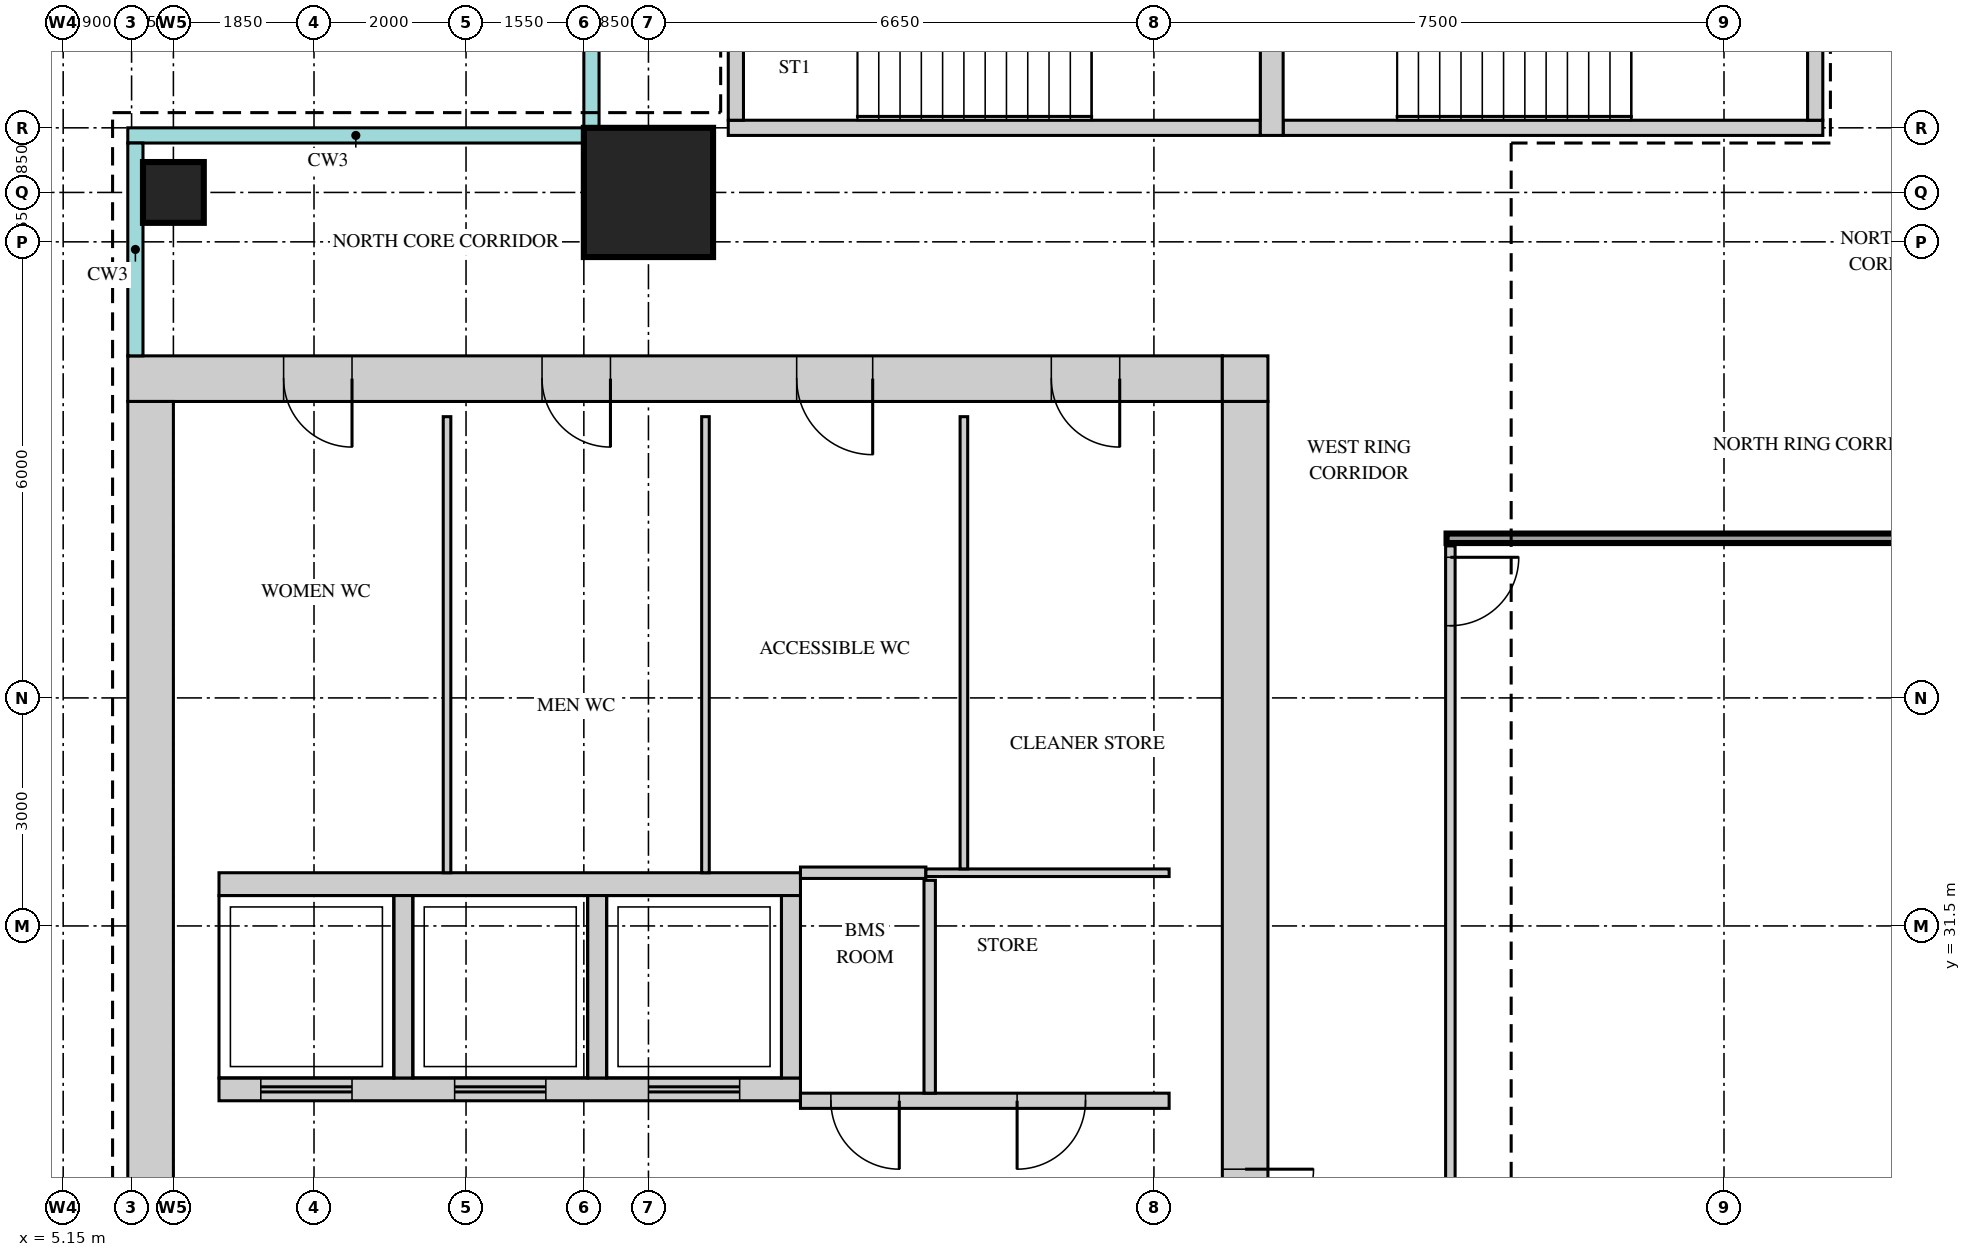
"""IFC4 building model, lengths in metres.
Left out: names, types, materials, properties, quantities, classifications, styles, units other than length and angle.
Written with IfcOpenShell. Run it as: python <this file> out.ifc"""

import sys

from ifc_helpers import new_model, si_unit, direction, frame, frame_2d, origin, origin_2d, place, context, subcontext, project, spatial, rectangle, extrude, source, transform, mapped, element, fill, save


model = new_model("IFC4")
c1 = context("Model", 3, precision=1e-05, world=origin(), true_north=direction((0.0, 1.0)))
c2 = subcontext(c1, "Body", "Model", "MODEL_VIEW")
j1 = project(units=[si_unit("LENGTHUNIT", "METRE"), si_unit("PLANEANGLEUNIT", "RADIAN")], contexts=[c1])
p1 = place(None, origin())
s1 = spatial("IfcSite", under=j1, at=p1, CompositionType="ELEMENT")
p2 = place(p1, origin())
s2 = spatial("IfcBuilding", under=s1, at=p2, CompositionType="ELEMENT")
p3 = place(p2, frame((0.0, 0.0, 322.2)))
s3 = spatial("IfcBuildingStorey", under=s2, at=p3, CompositionType="ELEMENT", Elevation=322.2)
m1 = source(origin(), c2, "Body", "SweptSolid", [
    extrude(rectangle(XDim=14.4, YDim=0.6, at=frame_2d((7.2, 0.0))), origin(), (0.0, 0.0, 1.0), 3.75),
])
p4 = place(p3, frame((6.0, 38.7, 0.0), z_axis=(0.0, 0.0, 1.0), x_axis=(1.0, 0.0, 0.0)))
e1 = element("IfcWall", 1, at=p4, inside=s3, PredefinedType="SHEAR", context=c2, shape_type="MappedRepresentation", body=[
    mapped(m1, transform((0.0, 0.0, 0.0))),
])
m2 = source(origin(), c2, "Body", "SweptSolid", [
    extrude(rectangle(XDim=0.9, YDim=2.1, at=frame_2d((0.45, 1.05))), frame((0.0, 0.31, 0.0), z_axis=(0.0, -1.0, 0.0), x_axis=(1.0, 0.0, 0.0)), (0.0, 0.0, 1.0), 0.62),
])
p5 = place(p4, frame((2.05, 0.0, 0.0)))
e2 = element("IfcOpeningElement", 2, at=p5, cuts=e1, PredefinedType="OPENING", context=c2, shape_type="MappedRepresentation", body=[
    mapped(m2, transform((0.0, 0.0, 0.0))),
])
p6 = place(p4, frame((5.45, 0.0, 0.0)))
e3 = element("IfcOpeningElement", 3, at=p6, cuts=e1, PredefinedType="OPENING", context=c2, shape_type="MappedRepresentation", body=[
    mapped(m2, transform((0.0, 0.0, 0.0))),
])
m3 = source(origin(), c2, "Body", "SweptSolid", [
    extrude(rectangle(XDim=1.0, YDim=2.1, at=frame_2d((0.5, 1.05))), frame((0.0, 0.31, 0.0), z_axis=(0.0, -1.0, 0.0), x_axis=(1.0, 0.0, 0.0)), (0.0, 0.0, 1.0), 0.62),
])
p7 = place(p4, frame((8.8, 0.0, 0.0)))
e4 = element("IfcOpeningElement", 4, at=p7, cuts=e1, PredefinedType="OPENING", context=c2, shape_type="MappedRepresentation", body=[
    mapped(m3, transform((0.0, 0.0, 0.0))),
])
p8 = place(p4, frame((12.15, 0.0, 0.0)))
e5 = element("IfcOpeningElement", 5, at=p8, cuts=e1, PredefinedType="OPENING", context=c2, shape_type="MappedRepresentation", body=[
    mapped(m2, transform((0.0, 0.0, 0.0))),
])
m4 = source(origin(), c2, "Body", "SweptSolid", [
    extrude(rectangle(XDim=0.6, YDim=0.6, at=frame_2d((0.3, 0.0))), origin(), (0.0, 0.0, 1.0), 3.75),
])
p9 = place(p3, frame((20.4, 38.7, 0.0), z_axis=(0.0, 0.0, 1.0), x_axis=(1.0, 0.0, 0.0)))
e6 = element("IfcWall", 6, at=p9, inside=s3, PredefinedType="SHEAR", context=c2, shape_type="MappedRepresentation", body=[
    mapped(m4, transform((0.0, 0.0, 0.0))),
])
m5 = source(origin(), c2, "Body", "SweptSolid", [
    extrude(rectangle(XDim=22.8, YDim=0.6, at=frame_2d((11.4, 0.0))), origin(), (0.0, 0.0, 1.0), 3.75),
])
p10 = place(p3, frame((20.7, 15.6, 0.0), z_axis=(0.0, 0.0, 1.0), x_axis=(0.0, 1.0, 0.0)))
e7 = element("IfcWall", 7, at=p10, inside=s3, PredefinedType="SHEAR", context=c2, shape_type="MappedRepresentation", body=[
    mapped(m5, transform((0.0, 0.0, 0.0))),
])
m6 = source(origin(), c2, "Body", "SweptSolid", [
    extrude(rectangle(XDim=1.8, YDim=2.1, at=frame_2d((0.9, 1.05))), frame((0.0, 0.31, 0.0), z_axis=(0.0, -1.0, 0.0), x_axis=(1.0, 0.0, 0.0)), (0.0, 0.0, 1.0), 0.62),
])
p11 = place(p10, frame((10.9, 0.0, 0.0)))
e8 = element("IfcOpeningElement", 8, at=p11, cuts=e7, PredefinedType="OPENING", context=c2, shape_type="MappedRepresentation", body=[
    mapped(m6, transform((0.0, 0.0, 0.0))),
])
p12 = place(p10, frame((0.55, 0.0, 0.0)))
e9 = element("IfcOpeningElement", 9, at=p12, cuts=e7, PredefinedType="OPENING", context=c2, shape_type="MappedRepresentation", body=[
    mapped(m2, transform((0.0, 0.0, 0.0))),
])
p13 = place(p10, frame((4.1, 0.0, 0.0)))
e10 = element("IfcOpeningElement", 10, at=p13, cuts=e7, PredefinedType="OPENING", context=c2, shape_type="MappedRepresentation", body=[
    mapped(m2, transform((0.0, 0.0, 0.0))),
])
p14 = place(p3, frame((6.3, 15.6, 0.0), z_axis=(0.0, 0.0, 1.0), x_axis=(0.0, 1.0, 0.0)))
e11 = element("IfcWall", 11, at=p14, inside=s3, PredefinedType="SHEAR", context=c2, shape_type="MappedRepresentation", body=[
    mapped(m5, transform((0.0, 0.0, 0.0))),
])
m7 = source(origin(), c2, "Body", "SweptSolid", [
    extrude(rectangle(XDim=7.0, YDim=0.2, at=frame_2d((3.5, 0.0))), origin(), (0.0, 0.0, 1.0), 3.75),
])
p15 = place(p3, frame((13.9, 42.0, 0.0), z_axis=(0.0, 0.0, 1.0), x_axis=(1.0, 0.0, 0.0)))
e12 = element("IfcWall", 12, at=p15, inside=s3, PredefinedType="SHEAR", context=c2, shape_type="MappedRepresentation", body=[
    mapped(m7, transform((0.0, 0.0, 0.0))),
])
m8 = source(origin(), c2, "Body", "SweptSolid", [
    extrude(rectangle(XDim=7.1, YDim=0.2, at=frame_2d((3.55, 0.0))), origin(), (0.0, 0.0, 1.0), 3.75),
])
p16 = place(p3, frame((21.2, 42.0, 0.0), z_axis=(0.0, 0.0, 1.0), x_axis=(1.0, 0.0, 0.0)))
e13 = element("IfcWall", 13, at=p16, inside=s3, PredefinedType="SHEAR", context=c2, shape_type="MappedRepresentation", body=[
    mapped(m8, transform((0.0, 0.0, 0.0))),
])
m9 = source(origin(), c2, "Body", "SweptSolid", [
    extrude(rectangle(XDim=3.75, YDim=0.3, at=frame_2d((1.875, 0.0))), origin(), (0.0, 0.0, 1.0), 3.75),
])
p17 = place(p3, frame((21.05, 41.9, 0.0), z_axis=(0.0, 0.0, 1.0), x_axis=(0.0, 1.0, 0.0)))
e14 = element("IfcWall", 14, at=p17, inside=s3, PredefinedType="SHEAR", context=c2, shape_type="MappedRepresentation", body=[
    mapped(m9, transform((0.0, 0.0, 0.0))),
])
m10 = source(origin(), c2, "Body", "SweptSolid", [
    extrude(rectangle(XDim=3.35, YDim=0.2, at=frame_2d((1.675, 0.0))), origin(), (0.0, 0.0, 1.0), 3.75),
])
for number, where, z_axis, x_axis in (
    (15, (14.0, 42.1, 0.0), (0.0, 0.0, 1.0), (0.0, 1.0, 0.0)),
    (16, (28.2, 42.1, 0.0), (0.0, 0.0, 1.0), (0.0, 1.0, 0.0)),
):
    element("IfcWall", number, at=place(p3, frame(where, z_axis=z_axis, x_axis=x_axis)), inside=s3, PredefinedType="SHEAR", context=c2, shape_type="MappedRepresentation", body=[
        mapped(m10, transform((0.0, 0.0, 0.0))),
    ])
m11 = source(origin(), c2, "Body", "SweptSolid", [
    extrude(rectangle(XDim=7.65, YDim=0.3, at=frame_2d((3.825, 0.0))), origin(), (0.0, 0.0, 1.0), 3.75),
])
p18 = place(p3, frame((7.2, 32.05, 0.0), z_axis=(0.0, 0.0, 1.0), x_axis=(1.0, 0.0, 0.0)))
e17 = element("IfcWall", 17, at=p18, inside=s3, PredefinedType="STANDARD", context=c2, shape_type="MappedRepresentation", body=[
    mapped(m11, transform((0.0, 0.0, 0.0))),
])
p19 = place(p3, frame((7.2, 29.35, 0.0), z_axis=(0.0, 0.0, 1.0), x_axis=(1.0, 0.0, 0.0)))
e18 = element("IfcWall", 18, at=p19, inside=s3, PredefinedType="STANDARD", context=c2, shape_type="MappedRepresentation", body=[
    mapped(m11, transform((0.0, 0.0, 0.0))),
])
m12 = source(origin(), c2, "Body", "SweptSolid", [
    extrude(rectangle(XDim=1.2, YDim=2.1, at=frame_2d((0.6, 1.05))), frame((0.0, 0.16, 0.0), z_axis=(0.0, -1.0, 0.0), x_axis=(1.0, 0.0, 0.0)), (0.0, 0.0, 1.0), 0.32),
])
p20 = place(p19, frame((0.55, 0.0, 0.0)))
e19 = element("IfcOpeningElement", 19, at=p20, cuts=e18, PredefinedType="OPENING", context=c2, shape_type="MappedRepresentation", body=[
    mapped(m12, transform((0.0, 0.0, 0.0))),
])
p21 = place(p19, frame((3.1, 0.0, 0.0)))
e20 = element("IfcOpeningElement", 20, at=p21, cuts=e18, PredefinedType="OPENING", context=c2, shape_type="MappedRepresentation", body=[
    mapped(m12, transform((0.0, 0.0, 0.0))),
])
p22 = place(p19, frame((5.65, 0.0, 0.0)))
e21 = element("IfcOpeningElement", 21, at=p22, cuts=e18, PredefinedType="OPENING", context=c2, shape_type="MappedRepresentation", body=[
    mapped(m12, transform((0.0, 0.0, 0.0))),
])
m13 = source(origin(), c2, "Body", "SweptSolid", [
    extrude(rectangle(XDim=2.4, YDim=0.25, at=frame_2d((1.2, 0.0))), origin(), (0.0, 0.0, 1.0), 3.75),
])
for number, where, z_axis, x_axis in (
    (22, (9.625, 29.5, 0.0), (0.0, 0.0, 1.0), (0.0, 1.0, 0.0)),
    (23, (12.175, 29.5, 0.0), (0.0, 0.0, 1.0), (0.0, 1.0, 0.0)),
    (24, (14.725, 29.5, 0.0), (0.0, 0.0, 1.0), (0.0, 1.0, 0.0)),
):
    element("IfcWall", number, at=place(p3, frame(where, z_axis=z_axis, x_axis=x_axis)), inside=s3, PredefinedType="STANDARD", context=c2, shape_type="MappedRepresentation", body=[
        mapped(m13, transform((0.0, 0.0, 0.0))),
    ])
m14 = source(origin(), c2, "Body", "SweptSolid", [
    extrude(rectangle(XDim=1.7, YDim=1.7, at=origin_2d()), origin(), (0.0, 0.0, 1.0), 3.75),
])
p23 = place(p3, frame((12.85, 41.15, 0.0), z_axis=(0.0, 0.0, 1.0), x_axis=(1.0, 0.0, 0.0)))
e25 = element("IfcColumn", 25, at=p23, inside=s3, PredefinedType="COLUMN", context=c2, shape_type="MappedRepresentation", body=[
    mapped(m14, transform((0.0, 0.0, 0.0))),
])
m15 = source(origin(), c2, "Body", "SweptSolid", [
    extrude(rectangle(XDim=0.8, YDim=0.8, at=origin_2d()), origin(), (0.0, 0.0, 1.0), 3.75),
])
p24 = place(p3, frame((6.6, 41.15, 0.0), z_axis=(0.0, 0.0, 1.0), x_axis=(1.0, 0.0, 0.0)))
e26 = element("IfcColumn", 26, at=p24, inside=s3, PredefinedType="COLUMN", context=c2, shape_type="MappedRepresentation", body=[
    mapped(m15, transform((0.0, 0.0, 0.0))),
])
m16 = source(origin(), c2, "Body", "SweptSolid", [
    extrude(rectangle(XDim=19.0, YDim=0.125, at=frame_2d((9.5, 0.0))), origin(), (0.0, 0.0, 1.0), 3.8),
])
p25 = place(p3, frame((23.4, 17.5, 0.0), z_axis=(0.0, 0.0, 1.0), x_axis=(0.0, 1.0, 0.0)))
e27 = element("IfcWall", 27, at=p25, inside=s3, PredefinedType="PARTITIONING", context=c2, shape_type="MappedRepresentation", body=[
    mapped(m16, transform((0.0, 0.0, 0.0))),
])
m17 = source(origin(), c2, "Body", "SweptSolid", [
    extrude(rectangle(XDim=1.2, YDim=2.1, at=frame_2d((0.6, 1.05))), frame((0.0, 0.073, 0.0), z_axis=(0.0, -1.0, 0.0), x_axis=(1.0, 0.0, 0.0)), (0.0, 0.0, 1.0), 0.145),
])
p26 = place(p25, frame((8.9, 0.0, 0.0)))
e28 = element("IfcOpeningElement", 28, at=p26, cuts=e27, PredefinedType="OPENING", context=c2, shape_type="MappedRepresentation", body=[
    mapped(m17, transform((0.0, 0.0, 0.0))),
])
m18 = source(origin(), c2, "Body", "SweptSolid", [
    extrude(rectangle(XDim=0.9, YDim=2.1, at=frame_2d((0.45, 1.05))), frame((0.0, 0.073, 0.0), z_axis=(0.0, -1.0, 0.0), x_axis=(1.0, 0.0, 0.0)), (0.0, 0.0, 1.0), 0.145),
])
p27 = place(p25, frame((17.95, 0.0, 0.0)))
e29 = element("IfcOpeningElement", 29, at=p27, cuts=e27, PredefinedType="OPENING", context=c2, shape_type="MappedRepresentation", body=[
    mapped(m18, transform((0.0, 0.0, 0.0))),
])
m19 = source(origin(), c2, "Body", "SweptSolid", [
    extrude(rectangle(XDim=4.85, YDim=0.2, at=frame_2d((2.425, 0.0))), origin(), (0.0, 0.0, 1.0), 3.8),
])
p28 = place(p3, frame((14.85, 29.2, 0.0), z_axis=(0.0, 0.0, 1.0), x_axis=(1.0, 0.0, 0.0)))
e30 = element("IfcWall", 30, at=p28, inside=s3, PredefinedType="PARTITIONING", context=c2, shape_type="MappedRepresentation", body=[
    mapped(m19, transform((0.0, 0.0, 0.0))),
])
m20 = source(origin(), c2, "Body", "SweptSolid", [
    extrude(rectangle(XDim=0.9, YDim=2.1, at=frame_2d((0.45, 1.05))), frame((0.0, 0.11, 0.0), z_axis=(0.0, -1.0, 0.0), x_axis=(1.0, 0.0, 0.0)), (0.0, 0.0, 1.0), 0.22),
])
p29 = place(p28, frame((0.4, 0.0, 0.0)))
e31 = element("IfcOpeningElement", 31, at=p29, cuts=e30, PredefinedType="OPENING", context=c2, shape_type="MappedRepresentation", body=[
    mapped(m20, transform((0.0, 0.0, 0.0))),
])
p30 = place(p28, frame((2.85, 0.0, 0.0)))
e32 = element("IfcOpeningElement", 32, at=p30, cuts=e30, PredefinedType="OPENING", context=c2, shape_type="MappedRepresentation", body=[
    mapped(m20, transform((0.0, 0.0, 0.0))),
])
m21 = source(origin(), c2, "Body", "SweptSolid", [
    extrude(rectangle(XDim=2.8, YDim=0.15, at=frame_2d((1.4, 0.0))), origin(), (0.0, 0.0, 1.0), 3.8),
])
p31 = place(p3, frame((16.55, 29.3, 0.0), z_axis=(0.0, 0.0, 1.0), x_axis=(0.0, 1.0, 0.0)))
e33 = element("IfcWall", 33, at=p31, inside=s3, PredefinedType="PARTITIONING", context=c2, shape_type="MappedRepresentation", body=[
    mapped(m21, transform((0.0, 0.0, 0.0))),
])
m22 = source(origin(), c2, "Body", "SweptSolid", [
    extrude(rectangle(XDim=6.0, YDim=0.1, at=frame_2d((3.0, 0.0))), origin(), (0.0, 0.0, 1.0), 3.8),
])
for number, where, z_axis, x_axis in (
    (34, (10.2, 32.2, 0.0), (0.0, 0.0, 1.0), (0.0, 1.0, 0.0)),
    (35, (13.6, 32.2, 0.0), (0.0, 0.0, 1.0), (0.0, 1.0, 0.0)),
):
    element("IfcWall", number, at=place(p3, frame(where, z_axis=z_axis, x_axis=x_axis)), inside=s3, PredefinedType="PARTITIONING", context=c2, shape_type="MappedRepresentation", body=[
        mapped(m22, transform((0.0, 0.0, 0.0))),
    ])
m23 = source(origin(), c2, "Body", "SweptSolid", [
    extrude(rectangle(XDim=1.65, YDim=0.15, at=frame_2d((0.825, 0.0))), origin(), (0.0, 0.0, 1.0), 3.8),
])
p32 = place(p3, frame((14.85, 32.2, 0.0), z_axis=(0.0, 0.0, 1.0), x_axis=(1.0, 0.0, 0.0)))
e36 = element("IfcWall", 36, at=p32, inside=s3, PredefinedType="PARTITIONING", context=c2, shape_type="MappedRepresentation", body=[
    mapped(m23, transform((0.0, 0.0, 0.0))),
])
m24 = source(origin(), c2, "Body", "SweptSolid", [
    extrude(rectangle(XDim=3.2, YDim=0.1, at=frame_2d((1.6, 0.0))), origin(), (0.0, 0.0, 1.0), 3.8),
])
p33 = place(p3, frame((16.5, 32.2, 0.0), z_axis=(0.0, 0.0, 1.0), x_axis=(1.0, 0.0, 0.0)))
e37 = element("IfcWall", 37, at=p33, inside=s3, PredefinedType="PARTITIONING", context=c2, shape_type="MappedRepresentation", body=[
    mapped(m24, transform((0.0, 0.0, 0.0))),
])
m25 = source(origin(), c2, "Body", "SweptSolid", [
    extrude(rectangle(XDim=5.95, YDim=0.1, at=frame_2d((2.975, 0.0))), origin(), (0.0, 0.0, 1.0), 3.8),
])
p34 = place(p3, frame((17.0, 32.25, 0.0), z_axis=(0.0, 0.0, 1.0), x_axis=(0.0, 1.0, 0.0)))
e38 = element("IfcWall", 38, at=p34, inside=s3, PredefinedType="PARTITIONING", context=c2, shape_type="MappedRepresentation", body=[
    mapped(m25, transform((0.0, 0.0, 0.0))),
])
m26 = source(origin(), c2, "Body", "SweptSolid", [
    extrude(rectangle(XDim=16.7, YDim=0.125, at=frame_2d((8.35, 0.0))), origin(), (0.0, 0.0, 1.0), 3.8),
])
p35 = place(p3, frame((23.35, 36.6, 0.0), z_axis=(0.0, 0.0, 1.0), x_axis=(1.0, 0.0, 0.0)))
e39 = element("IfcWall", 39, at=p35, inside=s3, PredefinedType="PARTITIONING", context=c2, shape_type="MappedRepresentation", body=[
    mapped(m26, transform((0.0, 0.0, 0.0))),
])
m27 = source(origin(), c2, "Body", "SweptSolid", [
    extrude(rectangle(XDim=0.9, YDim=2.1, at=frame_2d((0.45, 1.05))), frame((0.0, 0.025, 0.0), z_axis=(0.0, -1.0, 0.0), x_axis=(1.0, 0.0, 0.0)), (0.0, 0.0, 1.0), 0.05),
])
p36 = place(p29, origin())
e40 = element("IfcDoor", 40, at=p36, inside=s3, OperationType="SINGLE_SWING_RIGHT", PredefinedType="DOOR", context=c2, shape_type="MappedRepresentation", body=[
    mapped(m27, transform((0.0, 0.0, 0.0))),
])
fill(e31, e40)
p37 = place(p30, origin())
e41 = element("IfcDoor", 41, at=p37, inside=s3, OperationType="SINGLE_SWING_LEFT", PredefinedType="DOOR", context=c2, shape_type="MappedRepresentation", body=[
    mapped(m27, transform((0.0, 0.0, 0.0))),
])
fill(e32, e41)
m28 = source(origin(), c2, "Body", "SweptSolid", [
    extrude(rectangle(XDim=1.8, YDim=2.1, at=frame_2d((0.9, 1.05))), frame((0.0, 0.25, 0.0), z_axis=(0.0, -1.0, 0.0), x_axis=(1.0, 0.0, 0.0)), (0.0, 0.0, 1.0), 0.5),
])
p38 = place(p11, origin())
e42 = element("IfcDoor", 42, at=p38, inside=s3, OperationType="DOUBLE_DOOR_SINGLE_SWING", PredefinedType="DOOR", context=c2, shape_type="MappedRepresentation", body=[
    mapped(m28, transform((0.0, 0.0, 0.0))),
])
fill(e8, e42)
m29 = source(origin(), c2, "Body", "SweptSolid", [
    extrude(rectangle(XDim=0.9, YDim=2.1, at=frame_2d((0.45, 1.05))), frame((0.0, 0.25, 0.0), z_axis=(0.0, -1.0, 0.0), x_axis=(1.0, 0.0, 0.0)), (0.0, 0.0, 1.0), 0.5),
])
p39 = place(p5, origin())
e43 = element("IfcDoor", 43, at=p39, inside=s3, OperationType="SINGLE_SWING_RIGHT", PredefinedType="DOOR", context=c2, shape_type="MappedRepresentation", body=[
    mapped(m29, transform((0.0, 0.0, 0.0))),
])
fill(e2, e43)
p40 = place(p6, origin())
e44 = element("IfcDoor", 44, at=p40, inside=s3, OperationType="SINGLE_SWING_RIGHT", PredefinedType="DOOR", context=c2, shape_type="MappedRepresentation", body=[
    mapped(m29, transform((0.0, 0.0, 0.0))),
])
fill(e3, e44)
m30 = source(origin(), c2, "Body", "SweptSolid", [
    extrude(rectangle(XDim=1.0, YDim=2.1, at=frame_2d((0.5, 1.05))), frame((0.0, 0.25, 0.0), z_axis=(0.0, -1.0, 0.0), x_axis=(1.0, 0.0, 0.0)), (0.0, 0.0, 1.0), 0.5),
])
p41 = place(p7, origin())
e45 = element("IfcDoor", 45, at=p41, inside=s3, OperationType="SINGLE_SWING_RIGHT", PredefinedType="DOOR", context=c2, shape_type="MappedRepresentation", body=[
    mapped(m30, transform((0.0, 0.0, 0.0))),
])
fill(e4, e45)
p42 = place(p8, origin())
e46 = element("IfcDoor", 46, at=p42, inside=s3, OperationType="SINGLE_SWING_RIGHT", PredefinedType="DOOR", context=c2, shape_type="MappedRepresentation", body=[
    mapped(m29, transform((0.0, 0.0, 0.0))),
])
fill(e5, e46)
p43 = place(p27, origin())
e47 = element("IfcDoor", 47, at=p43, inside=s3, OperationType="SINGLE_SWING_RIGHT", PredefinedType="DOOR", context=c2, shape_type="MappedRepresentation", body=[
    mapped(m27, transform((0.0, 0.0, 0.0))),
])
fill(e29, e47)
m31 = source(origin(), c2, "Body", "SweptSolid", [
    extrude(rectangle(XDim=1.2, YDim=2.1, at=frame_2d((0.6, 1.05))), frame((0.0, 0.025, 0.0), z_axis=(0.0, -1.0, 0.0), x_axis=(1.0, 0.0, 0.0)), (0.0, 0.0, 1.0), 0.05),
])
p44 = place(p20, origin())
e48 = element("IfcDoor", 48, at=p44, inside=s3, OperationType="DOUBLE_DOOR_SLIDING", PredefinedType="DOOR", context=c2, shape_type="MappedRepresentation", body=[
    mapped(m31, transform((0.0, 0.0, 0.0))),
])
fill(e19, e48)
p45 = place(p21, origin())
e49 = element("IfcDoor", 49, at=p45, inside=s3, OperationType="DOUBLE_DOOR_SLIDING", PredefinedType="DOOR", context=c2, shape_type="MappedRepresentation", body=[
    mapped(m31, transform((0.0, 0.0, 0.0))),
])
fill(e20, e49)
p46 = place(p22, origin())
e50 = element("IfcDoor", 50, at=p46, inside=s3, OperationType="DOUBLE_DOOR_SLIDING", PredefinedType="DOOR", context=c2, shape_type="MappedRepresentation", body=[
    mapped(m31, transform((0.0, 0.0, 0.0))),
])
fill(e21, e50)
save(model, sys.argv[1])
